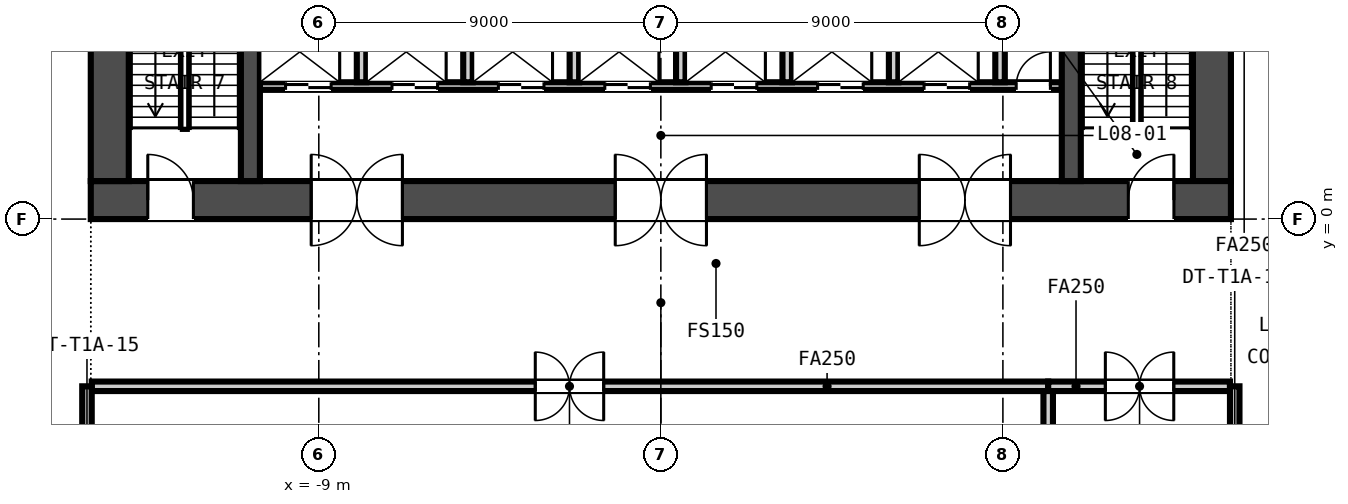
"""IFC4 building model, lengths in metres.
Left out: names, types, materials, properties, quantities, classifications, styles, units other than length and angle.
Written with IfcOpenShell. Run it as: python <this file> out.ifc"""

import sys

from ifc_helpers import new_model, si_unit, direction, frame, frame_2d, origin, place, context, subcontext, project, spatial, rectangle, extrude, element, fill, save


model = new_model("IFC4")
c1 = context("Model", 3, precision=1e-05, world=origin(), true_north=direction((0.0, 1.0)))
c2 = subcontext(c1, "Body", "Model", "MODEL_VIEW")
j1 = project(units=[si_unit("LENGTHUNIT", "METRE"), si_unit("PLANEANGLEUNIT", "RADIAN")], contexts=[c1])
p1 = place(None, origin())
s1 = spatial("IfcSite", under=j1, at=p1, CompositionType="ELEMENT")
p2 = place(p1, origin())
s2 = spatial("IfcBuilding", under=s1, at=p2, CompositionType="ELEMENT")
p3 = place(p2, frame((0.0, 0.0, 43.3)))
s3 = spatial("IfcBuildingStorey", under=s2, at=p3, CompositionType="ELEMENT", Elevation=43.3)
p4 = place(p3, frame((-15.0, 0.5, -0.15), z_axis=(0.0, 0.0, 1.0), x_axis=(1.0, 0.0, 0.0)))
e1 = element("IfcWall", 1, at=p4, inside=s3, PredefinedType="SOLIDWALL", context=c2, shape_type="SweptSolid", body=[
    extrude(rectangle(XDim=30.0, YDim=1.0, at=frame_2d((15.0, 0.0))), origin(), (0.0, 0.0, 1.0), 3.65),
])
p5 = place(p4, frame((5.8, 0.0, 0.15)))
e2 = element("IfcOpeningElement", 2, at=p5, cuts=e1, PredefinedType="OPENING", context=c2, shape_type="SweptSolid", body=[
    extrude(rectangle(XDim=2.4, YDim=2.4, at=frame_2d((1.2, 1.2))), frame((0.0, 0.51, 0.0), z_axis=(0.0, -1.0, 0.0), x_axis=(1.0, 0.0, 0.0)), (0.0, 0.0, 1.0), 1.02),
])
p6 = place(p4, frame((13.8, 0.0, 0.15)))
e3 = element("IfcOpeningElement", 3, at=p6, cuts=e1, PredefinedType="OPENING", context=c2, shape_type="SweptSolid", body=[
    extrude(rectangle(XDim=2.4, YDim=2.4, at=frame_2d((1.2, 1.2))), frame((0.0, 0.51, 0.0), z_axis=(0.0, -1.0, 0.0), x_axis=(1.0, 0.0, 0.0)), (0.0, 0.0, 1.0), 1.02),
])
p7 = place(p4, frame((21.8, 0.0, 0.15)))
e4 = element("IfcOpeningElement", 4, at=p7, cuts=e1, PredefinedType="OPENING", context=c2, shape_type="SweptSolid", body=[
    extrude(rectangle(XDim=2.4, YDim=2.4, at=frame_2d((1.2, 1.2))), frame((0.0, 0.51, 0.0), z_axis=(0.0, -1.0, 0.0), x_axis=(1.0, 0.0, 0.0)), (0.0, 0.0, 1.0), 1.02),
])
p8 = place(p4, frame((1.5, 0.0, 0.15)))
e5 = element("IfcOpeningElement", 5, at=p8, cuts=e1, PredefinedType="OPENING", context=c2, shape_type="SweptSolid", body=[
    extrude(rectangle(XDim=1.2, YDim=2.1, at=frame_2d((0.6, 1.05))), frame((0.0, 0.51, 0.0), z_axis=(0.0, -1.0, 0.0), x_axis=(1.0, 0.0, 0.0)), (0.0, 0.0, 1.0), 1.02),
])
p9 = place(p4, frame((27.3, 0.0, 0.15)))
e6 = element("IfcOpeningElement", 6, at=p9, cuts=e1, PredefinedType="OPENING", context=c2, shape_type="SweptSolid", body=[
    extrude(rectangle(XDim=1.2, YDim=2.1, at=frame_2d((0.6, 1.05))), frame((0.0, 0.51, 0.0), z_axis=(0.0, -1.0, 0.0), x_axis=(1.0, 0.0, 0.0)), (0.0, 0.0, 1.0), 1.02),
])
for number, where, z_axis, x_axis in (
    (7, (-14.5, 1.0, -0.15), (0.0, 0.0, 1.0), (0.0, 1.0, 0.0)),
    (8, (14.5, 1.0, -0.15), (0.0, 0.0, 1.0), (0.0, 1.0, 0.0)),
):
    element("IfcWall", number, at=place(p3, frame(where, z_axis=z_axis, x_axis=x_axis)), inside=s3, PredefinedType="SOLIDWALL", context=c2, shape_type="SweptSolid", body=[
        extrude(rectangle(XDim=13.0, YDim=1.0, at=frame_2d((6.5, 0.0))), origin(), (0.0, 0.0, 1.0), 3.65),
    ])
for number, where, z_axis, x_axis in (
    (9, (-10.8, 1.0, -0.15), (0.0, 0.0, 1.0), (0.0, 1.0, 0.0)),
    (10, (10.8, 1.0, -0.15), (0.0, 0.0, 1.0), (0.0, 1.0, 0.0)),
):
    element("IfcWall", number, at=place(p3, frame(where, z_axis=z_axis, x_axis=x_axis)), inside=s3, PredefinedType="SOLIDWALL", context=c2, shape_type="SweptSolid", body=[
        extrude(rectangle(XDim=13.0, YDim=0.5, at=frame_2d((6.5, 0.0))), origin(), (0.0, 0.0, 1.0), 3.65),
    ])
p10 = place(p3, frame((-10.55, 3.5, 0.0), z_axis=(0.0, 0.0, 1.0), x_axis=(1.0, 0.0, 0.0)))
e11 = element("IfcWall", 11, at=p10, inside=s3, PredefinedType="PARTITIONING", context=c2, shape_type="SweptSolid", body=[
    extrude(rectangle(XDim=21.1, YDim=0.2, at=frame_2d((10.55, 0.0))), origin(), (0.0, 0.0, 1.0), 3.5),
])
p11 = place(p10, frame((0.675, 0.0, 0.0)))
e12 = element("IfcOpeningElement", 12, at=p11, cuts=e11, PredefinedType="OPENING", context=c2, shape_type="SweptSolid", body=[
    extrude(rectangle(XDim=1.2, YDim=2.1, at=frame_2d((0.6, 1.05))), frame((0.0, 0.11, 0.0), z_axis=(0.0, -1.0, 0.0), x_axis=(1.0, 0.0, 0.0)), (0.0, 0.0, 1.0), 0.22),
])
p12 = place(p10, frame((3.475, 0.0, 0.0)))
e13 = element("IfcOpeningElement", 13, at=p12, cuts=e11, PredefinedType="OPENING", context=c2, shape_type="SweptSolid", body=[
    extrude(rectangle(XDim=1.2, YDim=2.1, at=frame_2d((0.6, 1.05))), frame((0.0, 0.11, 0.0), z_axis=(0.0, -1.0, 0.0), x_axis=(1.0, 0.0, 0.0)), (0.0, 0.0, 1.0), 0.22),
])
p13 = place(p10, frame((6.275, 0.0, 0.0)))
e14 = element("IfcOpeningElement", 14, at=p13, cuts=e11, PredefinedType="OPENING", context=c2, shape_type="SweptSolid", body=[
    extrude(rectangle(XDim=1.2, YDim=2.1, at=frame_2d((0.6, 1.05))), frame((0.0, 0.11, 0.0), z_axis=(0.0, -1.0, 0.0), x_axis=(1.0, 0.0, 0.0)), (0.0, 0.0, 1.0), 0.22),
])
p14 = place(p10, frame((9.075, 0.0, 0.0)))
e15 = element("IfcOpeningElement", 15, at=p14, cuts=e11, PredefinedType="OPENING", context=c2, shape_type="SweptSolid", body=[
    extrude(rectangle(XDim=1.2, YDim=2.1, at=frame_2d((0.6, 1.05))), frame((0.0, 0.11, 0.0), z_axis=(0.0, -1.0, 0.0), x_axis=(1.0, 0.0, 0.0)), (0.0, 0.0, 1.0), 0.22),
])
p15 = place(p10, frame((11.875, 0.0, 0.0)))
e16 = element("IfcOpeningElement", 16, at=p15, cuts=e11, PredefinedType="OPENING", context=c2, shape_type="SweptSolid", body=[
    extrude(rectangle(XDim=1.2, YDim=2.1, at=frame_2d((0.6, 1.05))), frame((0.0, 0.11, 0.0), z_axis=(0.0, -1.0, 0.0), x_axis=(1.0, 0.0, 0.0)), (0.0, 0.0, 1.0), 0.22),
])
p16 = place(p10, frame((14.675, 0.0, 0.0)))
e17 = element("IfcOpeningElement", 17, at=p16, cuts=e11, PredefinedType="OPENING", context=c2, shape_type="SweptSolid", body=[
    extrude(rectangle(XDim=1.2, YDim=2.1, at=frame_2d((0.6, 1.05))), frame((0.0, 0.11, 0.0), z_axis=(0.0, -1.0, 0.0), x_axis=(1.0, 0.0, 0.0)), (0.0, 0.0, 1.0), 0.22),
])
p17 = place(p10, frame((17.475, 0.0, 0.0)))
e18 = element("IfcOpeningElement", 18, at=p17, cuts=e11, PredefinedType="OPENING", context=c2, shape_type="SweptSolid", body=[
    extrude(rectangle(XDim=1.2, YDim=2.1, at=frame_2d((0.6, 1.05))), frame((0.0, 0.11, 0.0), z_axis=(0.0, -1.0, 0.0), x_axis=(1.0, 0.0, 0.0)), (0.0, 0.0, 1.0), 0.22),
])
p18 = place(p10, frame((19.9, 0.0, 0.0)))
e19 = element("IfcOpeningElement", 19, at=p18, cuts=e11, PredefinedType="OPENING", context=c2, shape_type="SweptSolid", body=[
    extrude(rectangle(XDim=0.9, YDim=2.1, at=frame_2d((0.45, 1.05))), frame((0.0, 0.11, 0.0), z_axis=(0.0, -1.0, 0.0), x_axis=(1.0, 0.0, 0.0)), (0.0, 0.0, 1.0), 0.22),
])
for number, where, z_axis, x_axis in (
    (20, (-7.875, 3.6, 0.0), (0.0, 0.0, 1.0), (0.0, 1.0, 0.0)),
    (21, (-5.075, 3.6, 0.0), (0.0, 0.0, 1.0), (0.0, 1.0, 0.0)),
    (22, (-2.275, 3.6, 0.0), (0.0, 0.0, 1.0), (0.0, 1.0, 0.0)),
    (23, (0.525, 3.6, 0.0), (0.0, 0.0, 1.0), (0.0, 1.0, 0.0)),
    (24, (3.325, 3.6, 0.0), (0.0, 0.0, 1.0), (0.0, 1.0, 0.0)),
    (25, (6.125, 3.6, 0.0), (0.0, 0.0, 1.0), (0.0, 1.0, 0.0)),
    (26, (8.925, 3.6, 0.0), (0.0, 0.0, 1.0), (0.0, 1.0, 0.0)),
):
    element("IfcWall", number, at=place(p3, frame(where, z_axis=z_axis, x_axis=x_axis)), inside=s3, PredefinedType="PARTITIONING", context=c2, shape_type="SweptSolid", body=[
        extrude(rectangle(XDim=2.3, YDim=0.25, at=frame_2d((1.15, 0.0))), origin(), (0.0, 0.0, 1.0), 3.5),
    ])
p19 = place(p3, frame((10.192, -4.4, 0.0), z_axis=(0.0, 0.0, 1.0), x_axis=(-1.0, 0.0, 0.0)))
e27 = element("IfcWall", 27, at=p19, inside=s3, PredefinedType="PARTITIONING", context=c2, shape_type="SweptSolid", body=[
    extrude(rectangle(XDim=25.167, YDim=0.25, at=frame_2d((12.583, 0.0))), origin(), (0.0, 0.0, 1.0), 2.741),
])
p20 = place(p19, frame((11.696, 0.0, 0.0)))
e28 = element("IfcOpeningElement", 28, at=p20, cuts=e27, PredefinedType="OPENING", context=c2, shape_type="SweptSolid", body=[
    extrude(rectangle(XDim=1.8, YDim=2.1, at=frame_2d((0.9, 1.05))), frame((0.0, 0.135, 0.0), z_axis=(0.0, -1.0, 0.0), x_axis=(1.0, 0.0, 0.0)), (0.0, 0.0, 1.0), 0.27),
])
p21 = place(p3, frame((14.975, -4.4, 0.0), z_axis=(0.0, 0.0, 1.0), x_axis=(-1.0, 0.0, 0.0)))
e29 = element("IfcWall", 29, at=p21, inside=s3, PredefinedType="PARTITIONING", context=c2, shape_type="SweptSolid", body=[
    extrude(rectangle(XDim=4.783, YDim=0.25, at=frame_2d((2.392, 0.0))), origin(), (0.0, 0.0, 1.0), 2.741),
])
p22 = place(p21, frame((1.479, 0.0, 0.0)))
e30 = element("IfcOpeningElement", 30, at=p22, cuts=e29, PredefinedType="OPENING", context=c2, shape_type="SweptSolid", body=[
    extrude(rectangle(XDim=1.8, YDim=2.1, at=frame_2d((0.9, 1.05))), frame((0.0, 0.135, 0.0), z_axis=(0.0, -1.0, 0.0), x_axis=(1.0, 0.0, 0.0)), (0.0, 0.0, 1.0), 0.27),
])
p23 = place(p3, frame((-15.1, -4.4, 0.0), z_axis=(0.0, 0.0, 1.0), x_axis=(0.0, -1.0, 0.0)))
e31 = element("IfcWall", 31, at=p23, inside=s3, PredefinedType="PARTITIONING", context=c2, shape_type="SweptSolid", body=[
    extrude(rectangle(XDim=7.875, YDim=0.25, at=frame_2d((3.938, 0.0))), origin(), (0.0, 0.0, 1.0), 2.741),
])
p24 = place(p23, frame((3.038, 0.0, 0.0)))
e32 = element("IfcOpeningElement", 32, at=p24, cuts=e31, PredefinedType="OPENING", context=c2, shape_type="SweptSolid", body=[
    extrude(rectangle(XDim=1.8, YDim=2.1, at=frame_2d((0.9, 1.05))), frame((0.0, 0.135, 0.0), z_axis=(0.0, -1.0, 0.0), x_axis=(1.0, 0.0, 0.0)), (0.0, 0.0, 1.0), 0.27),
])
p25 = place(p3, frame((10.192, -29.22, 0.0), z_axis=(0.0, 0.0, 1.0), x_axis=(0.0, 1.0, 0.0)))
e33 = element("IfcWall", 33, at=p25, inside=s3, PredefinedType="PARTITIONING", context=c2, shape_type="SweptSolid", body=[
    extrude(rectangle(XDim=24.695, YDim=0.25, at=frame_2d((12.348, 0.0))), origin(), (0.0, 0.0, 1.0), 2.741),
])
p26 = place(p3, frame((15.1, -12.275, 0.0), z_axis=(0.0, 0.0, 1.0), x_axis=(0.0, 1.0, 0.0)))
e34 = element("IfcWall", 34, at=p26, inside=s3, PredefinedType="PARTITIONING", context=c2, shape_type="SweptSolid", body=[
    extrude(rectangle(XDim=7.875, YDim=0.25, at=frame_2d((3.938, 0.0))), origin(), (0.0, 0.0, 1.0), 2.741),
])
p27 = place(p26, frame((3.038, 0.0, 0.0)))
e35 = element("IfcOpeningElement", 35, at=p27, cuts=e34, PredefinedType="OPENING", context=c2, shape_type="SweptSolid", body=[
    extrude(rectangle(XDim=1.8, YDim=2.1, at=frame_2d((0.9, 1.05))), frame((0.0, 0.135, 0.0), z_axis=(0.0, -1.0, 0.0), x_axis=(1.0, 0.0, 0.0)), (0.0, 0.0, 1.0), 0.27),
])
p28 = place(p11, origin())
e36 = element("IfcDoor", 36, at=p28, inside=s3, OperationType="DOUBLE_DOOR_SLIDING", PredefinedType="DOOR", context=c2, shape_type="SweptSolid", body=[
    extrude(rectangle(XDim=1.2, YDim=2.1, at=frame_2d((0.6, 1.05))), frame((0.0, 0.025, 0.0), z_axis=(0.0, -1.0, 0.0), x_axis=(1.0, 0.0, 0.0)), (0.0, 0.0, 1.0), 0.05),
])
fill(e12, e36)
p29 = place(p12, origin())
e37 = element("IfcDoor", 37, at=p29, inside=s3, OperationType="DOUBLE_DOOR_SLIDING", PredefinedType="DOOR", context=c2, shape_type="SweptSolid", body=[
    extrude(rectangle(XDim=1.2, YDim=2.1, at=frame_2d((0.6, 1.05))), frame((0.0, 0.025, 0.0), z_axis=(0.0, -1.0, 0.0), x_axis=(1.0, 0.0, 0.0)), (0.0, 0.0, 1.0), 0.05),
])
fill(e13, e37)
p30 = place(p13, origin())
e38 = element("IfcDoor", 38, at=p30, inside=s3, OperationType="DOUBLE_DOOR_SLIDING", PredefinedType="DOOR", context=c2, shape_type="SweptSolid", body=[
    extrude(rectangle(XDim=1.2, YDim=2.1, at=frame_2d((0.6, 1.05))), frame((0.0, 0.025, 0.0), z_axis=(0.0, -1.0, 0.0), x_axis=(1.0, 0.0, 0.0)), (0.0, 0.0, 1.0), 0.05),
])
fill(e14, e38)
p31 = place(p14, origin())
e39 = element("IfcDoor", 39, at=p31, inside=s3, OperationType="DOUBLE_DOOR_SLIDING", PredefinedType="DOOR", context=c2, shape_type="SweptSolid", body=[
    extrude(rectangle(XDim=1.2, YDim=2.1, at=frame_2d((0.6, 1.05))), frame((0.0, 0.025, 0.0), z_axis=(0.0, -1.0, 0.0), x_axis=(1.0, 0.0, 0.0)), (0.0, 0.0, 1.0), 0.05),
])
fill(e15, e39)
p32 = place(p15, origin())
e40 = element("IfcDoor", 40, at=p32, inside=s3, OperationType="DOUBLE_DOOR_SLIDING", PredefinedType="DOOR", context=c2, shape_type="SweptSolid", body=[
    extrude(rectangle(XDim=1.2, YDim=2.1, at=frame_2d((0.6, 1.05))), frame((0.0, 0.025, 0.0), z_axis=(0.0, -1.0, 0.0), x_axis=(1.0, 0.0, 0.0)), (0.0, 0.0, 1.0), 0.05),
])
fill(e16, e40)
p33 = place(p16, origin())
e41 = element("IfcDoor", 41, at=p33, inside=s3, OperationType="DOUBLE_DOOR_SLIDING", PredefinedType="DOOR", context=c2, shape_type="SweptSolid", body=[
    extrude(rectangle(XDim=1.2, YDim=2.1, at=frame_2d((0.6, 1.05))), frame((0.0, 0.025, 0.0), z_axis=(0.0, -1.0, 0.0), x_axis=(1.0, 0.0, 0.0)), (0.0, 0.0, 1.0), 0.05),
])
fill(e17, e41)
p34 = place(p17, origin())
e42 = element("IfcDoor", 42, at=p34, inside=s3, OperationType="DOUBLE_DOOR_SLIDING", PredefinedType="DOOR", context=c2, shape_type="SweptSolid", body=[
    extrude(rectangle(XDim=1.2, YDim=2.1, at=frame_2d((0.6, 1.05))), frame((0.0, 0.025, 0.0), z_axis=(0.0, -1.0, 0.0), x_axis=(1.0, 0.0, 0.0)), (0.0, 0.0, 1.0), 0.05),
])
fill(e18, e42)
p35 = place(p18, origin())
e43 = element("IfcDoor", 43, at=p35, inside=s3, OperationType="SINGLE_SWING_RIGHT", PredefinedType="DOOR", context=c2, shape_type="SweptSolid", body=[
    extrude(rectangle(XDim=0.9, YDim=2.1, at=frame_2d((0.45, 1.05))), frame((0.0, 0.025, 0.0), z_axis=(0.0, -1.0, 0.0), x_axis=(1.0, 0.0, 0.0)), (0.0, 0.0, 1.0), 0.05),
])
fill(e19, e43)
p36 = place(p5, origin())
e44 = element("IfcDoor", 44, at=p36, inside=s3, OperationType="DOUBLE_DOOR_DOUBLE_SWING", PredefinedType="DOOR", context=c2, shape_type="SweptSolid", body=[
    extrude(rectangle(XDim=2.4, YDim=2.4, at=frame_2d((1.2, 1.2))), frame((0.0, 0.025, 0.0), z_axis=(0.0, -1.0, 0.0), x_axis=(1.0, 0.0, 0.0)), (0.0, 0.0, 1.0), 0.05),
])
fill(e2, e44)
p37 = place(p6, origin())
e45 = element("IfcDoor", 45, at=p37, inside=s3, OperationType="DOUBLE_DOOR_DOUBLE_SWING", PredefinedType="DOOR", context=c2, shape_type="SweptSolid", body=[
    extrude(rectangle(XDim=2.4, YDim=2.4, at=frame_2d((1.2, 1.2))), frame((0.0, 0.025, 0.0), z_axis=(0.0, -1.0, 0.0), x_axis=(1.0, 0.0, 0.0)), (0.0, 0.0, 1.0), 0.05),
])
fill(e3, e45)
p38 = place(p7, origin())
e46 = element("IfcDoor", 46, at=p38, inside=s3, OperationType="DOUBLE_DOOR_DOUBLE_SWING", PredefinedType="DOOR", context=c2, shape_type="SweptSolid", body=[
    extrude(rectangle(XDim=2.4, YDim=2.4, at=frame_2d((1.2, 1.2))), frame((0.0, 0.025, 0.0), z_axis=(0.0, -1.0, 0.0), x_axis=(1.0, 0.0, 0.0)), (0.0, 0.0, 1.0), 0.05),
])
fill(e4, e46)
p39 = place(p8, origin())
e47 = element("IfcDoor", 47, at=p39, inside=s3, OperationType="SINGLE_SWING_LEFT", PredefinedType="DOOR", context=c2, shape_type="SweptSolid", body=[
    extrude(rectangle(XDim=1.2, YDim=2.1, at=frame_2d((0.6, 1.05))), frame((0.0, 0.025, 0.0), z_axis=(0.0, -1.0, 0.0), x_axis=(1.0, 0.0, 0.0)), (0.0, 0.0, 1.0), 0.05),
])
fill(e5, e47)
p40 = place(p9, origin())
e48 = element("IfcDoor", 48, at=p40, inside=s3, OperationType="SINGLE_SWING_RIGHT", PredefinedType="DOOR", context=c2, shape_type="SweptSolid", body=[
    extrude(rectangle(XDim=1.2, YDim=2.1, at=frame_2d((0.6, 1.05))), frame((0.0, 0.025, 0.0), z_axis=(0.0, -1.0, 0.0), x_axis=(1.0, 0.0, 0.0)), (0.0, 0.0, 1.0), 0.05),
])
fill(e6, e48)
p41 = place(p20, origin())
e49 = element("IfcDoor", 49, at=p41, inside=s3, OperationType="DOUBLE_DOOR_DOUBLE_SWING", PredefinedType="DOOR", context=c2, shape_type="SweptSolid", body=[
    extrude(rectangle(XDim=1.8, YDim=2.1, at=frame_2d((0.9, 1.05))), frame((0.0, 0.025, 0.0), z_axis=(0.0, -1.0, 0.0), x_axis=(1.0, 0.0, 0.0)), (0.0, 0.0, 1.0), 0.05),
])
fill(e28, e49)
p42 = place(p22, origin())
e50 = element("IfcDoor", 50, at=p42, inside=s3, OperationType="DOUBLE_DOOR_DOUBLE_SWING", PredefinedType="DOOR", context=c2, shape_type="SweptSolid", body=[
    extrude(rectangle(XDim=1.8, YDim=2.1, at=frame_2d((0.9, 1.05))), frame((0.0, 0.025, 0.0), z_axis=(0.0, -1.0, 0.0), x_axis=(1.0, 0.0, 0.0)), (0.0, 0.0, 1.0), 0.05),
])
fill(e30, e50)
save(model, sys.argv[1])
